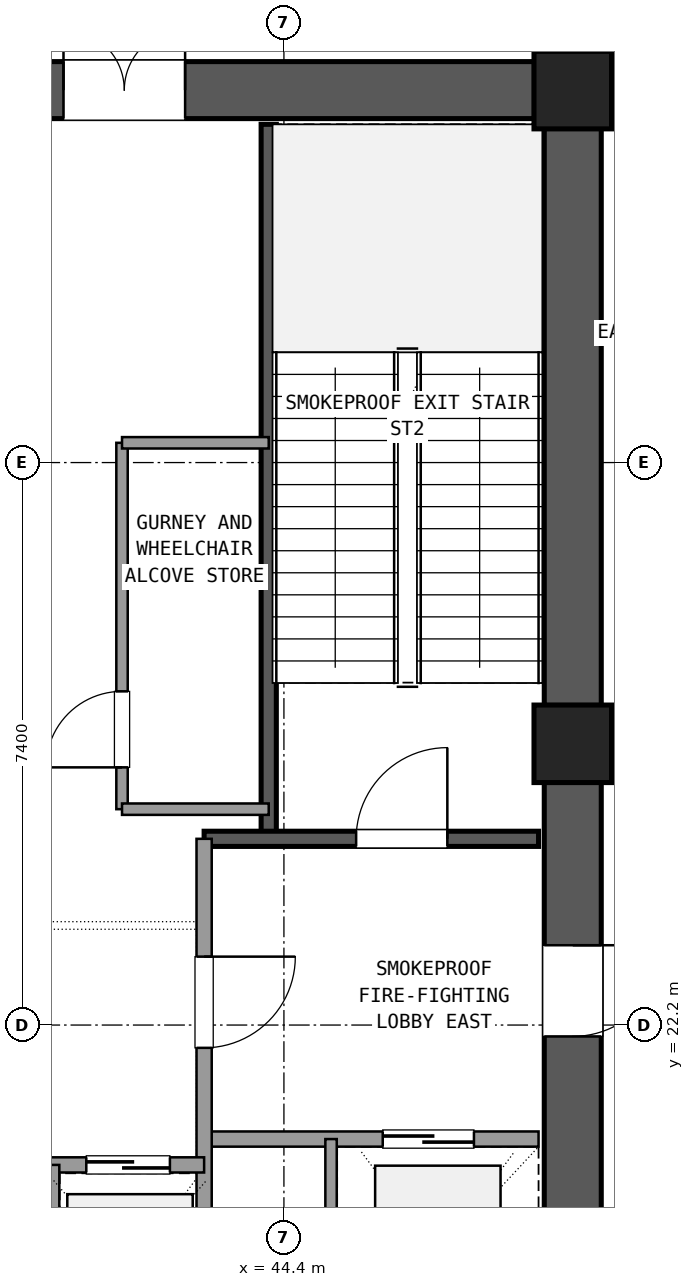
"""IFC4 building model, lengths in metres.
Left out: names, types, materials, properties, quantities, classifications, styles, units other than length and angle.
Written with IfcOpenShell. Run it as: python <this file> out.ifc"""

import sys

from ifc_helpers import new_model, si_unit, direction, frame, frame_2d, origin, origin_2d, place, context, subcontext, project, spatial, rectangle, extrude, element, fill, save


model = new_model("IFC4")
c1 = context("Model", 3, precision=1e-05, world=origin(), true_north=direction((0.0, 1.0)))
c2 = subcontext(c1, "Body", "Model", "MODEL_VIEW")
j1 = project(units=[si_unit("LENGTHUNIT", "METRE"), si_unit("PLANEANGLEUNIT", "RADIAN")], contexts=[c1])
p1 = place(None, origin())
s1 = spatial("IfcSite", under=j1, at=p1, CompositionType="ELEMENT")
p2 = place(p1, origin())
s2 = spatial("IfcBuilding", under=s1, at=p2, CompositionType="ELEMENT")
p3 = place(p2, frame((0.0, 0.0, 75.42)))
s3 = spatial("IfcBuildingStorey", under=s2, at=p3, CompositionType="ELEMENT", Elevation=75.42)
for number, where, z_axis, x_axis in (
    (1, (48.2, 25.9, 0.0), (0.0, 0.0, 1.0), (1.0, 0.0, 0.0)),
    (2, (48.2, 34.5, 0.0), (0.0, 0.0, 1.0), (1.0, 0.0, 0.0)),
):
    element("IfcColumn", number, at=place(p3, frame(where, z_axis=z_axis, x_axis=x_axis)), inside=s3, PredefinedType="COLUMN", context=c2, shape_type="SweptSolid", body=[
        extrude(rectangle(XDim=1.02, YDim=1.02, at=origin_2d()), origin(), (0.0, 0.0, 1.0), 5.76),
    ])
p4 = place(p3, frame((48.2, 17.805, 0.0), z_axis=(0.0, 0.0, 1.0), x_axis=(0.0, 1.0, 0.0)))
e3 = element("IfcWall", 3, at=p4, inside=s3, PredefinedType="SHEAR", context=c2, shape_type="SweptSolid", body=[
    extrude(rectangle(XDim=7.59, YDim=0.75, at=frame_2d((3.795, 0.0))), origin(), (0.0, 0.0, 1.0), 5.48),
])
p5 = place(p4, frame((4.245, 0.0, 0.0)))
e4 = element("IfcOpeningElement", 4, at=p5, cuts=e3, PredefinedType="OPENING", context=c2, shape_type="SweptSolid", body=[
    extrude(rectangle(XDim=1.2, YDim=2.15, at=frame_2d((0.6, 1.075))), frame((0.0, 0.385, 0.0), z_axis=(0.0, -1.0, 0.0), x_axis=(1.0, 0.0, 0.0)), (0.0, 0.0, 1.0), 0.77),
])
p6 = place(p3, frame((48.2, 26.405, 0.0), z_axis=(0.0, 0.0, 1.0), x_axis=(0.0, 1.0, 0.0)))
e5 = element("IfcWall", 5, at=p6, inside=s3, PredefinedType="SHEAR", context=c2, shape_type="SweptSolid", body=[
    extrude(rectangle(XDim=7.59, YDim=0.75, at=frame_2d((3.795, 0.0))), origin(), (0.0, 0.0, 1.0), 5.48),
])
p7 = place(p3, frame((47.695, 34.5, 0.0), z_axis=(0.0, 0.0, 1.0), x_axis=(-1.0, 0.0, 0.0)))
e6 = element("IfcWall", 6, at=p7, inside=s3, PredefinedType="SHEAR", context=c2, shape_type="SweptSolid", body=[
    extrude(rectangle(XDim=10.19, YDim=0.75, at=frame_2d((5.095, 0.0))), origin(), (0.0, 0.0, 1.0), 5.48),
])
p8 = place(p7, frame((4.595, 0.0, 0.0)))
e7 = element("IfcOpeningElement", 7, at=p8, cuts=e6, PredefinedType="OPENING", context=c2, shape_type="SweptSolid", body=[
    extrude(rectangle(XDim=1.6, YDim=2.2, at=frame_2d((0.8, 1.1))), frame((0.0, 0.385, 0.0), z_axis=(0.0, -1.0, 0.0), x_axis=(1.0, 0.0, 0.0)), (0.0, 0.0, 1.0), 0.77),
])
p9 = place(p3, frame((44.2, 24.65, 0.0), z_axis=(0.0, 0.0, 1.0), x_axis=(0.0, 1.0, 0.0)))
e8 = element("IfcWall", 8, at=p9, inside=s3, PredefinedType="SHEAR", context=c2, shape_type="SweptSolid", body=[
    extrude(rectangle(XDim=9.4, YDim=0.2, at=frame_2d((4.7, 0.0))), origin(), (0.0, 0.0, 1.0), 5.48),
])
p10 = place(p3, frame((43.35, 24.65, 0.0), z_axis=(0.0, 0.0, 1.0), x_axis=(1.0, 0.0, 0.0)))
e9 = element("IfcWall", 9, at=p10, inside=s3, PredefinedType="SHEAR", context=c2, shape_type="SweptSolid", body=[
    extrude(rectangle(XDim=4.4, YDim=0.2, at=frame_2d((2.2, 0.0))), origin(), (0.0, 0.0, 1.0), 5.48),
])
p11 = place(p10, frame((2.0, 0.0, 0.0)))
e10 = element("IfcOpeningElement", 10, at=p11, cuts=e9, PredefinedType="OPENING", context=c2, shape_type="SweptSolid", body=[
    extrude(rectangle(XDim=1.2, YDim=2.15, at=frame_2d((0.6, 1.075))), frame((0.0, 0.11, 0.0), z_axis=(0.0, -1.0, 0.0), x_axis=(1.0, 0.0, 0.0)), (0.0, 0.0, 1.0), 0.22),
])
p12 = place(p3, frame((43.35, 20.7, 0.0), z_axis=(0.0, 0.0, 1.0), x_axis=(1.0, 0.0, 0.0)))
e11 = element("IfcWall", 11, at=p12, inside=s3, PredefinedType="SOLIDWALL", context=c2, shape_type="SweptSolid", body=[
    extrude(rectangle(XDim=4.4, YDim=0.2, at=frame_2d((2.2, 0.0))), origin(), (0.0, 0.0, 1.0), 4.77),
])
p13 = place(p12, frame((2.35, 0.0, 0.0)))
e12 = element("IfcOpeningElement", 12, at=p13, cuts=e11, PredefinedType="OPENING", context=c2, shape_type="SweptSolid", body=[
    extrude(rectangle(XDim=1.2, YDim=2.15, at=frame_2d((0.6, 1.075))), frame((0.0, 0.11, 0.0), z_axis=(0.0, -1.0, 0.0), x_axis=(1.0, 0.0, 0.0)), (0.0, 0.0, 1.0), 0.22),
])
p14 = place(p3, frame((43.35, 17.75, 0.0), z_axis=(0.0, 0.0, 1.0), x_axis=(0.0, 1.0, 0.0)))
e13 = element("IfcWall", 13, at=p14, inside=s3, PredefinedType="SOLIDWALL", context=c2, shape_type="SweptSolid", body=[
    extrude(rectangle(XDim=6.9, YDim=0.2, at=frame_2d((3.45, 0.0))), origin(), (0.0, 0.0, 1.0), 4.77),
])
p15 = place(p14, frame((4.15, 0.0, 0.0)))
e14 = element("IfcOpeningElement", 14, at=p15, cuts=e13, PredefinedType="OPENING", context=c2, shape_type="SweptSolid", body=[
    extrude(rectangle(XDim=1.2, YDim=2.15, at=frame_2d((0.6, 1.075))), frame((0.0, 0.11, 0.0), z_axis=(0.0, -1.0, 0.0), x_axis=(1.0, 0.0, 0.0)), (0.0, 0.0, 1.0), 0.22),
])
p16 = place(p3, frame((45.02, 17.75, 0.0), z_axis=(0.0, 0.0, 1.0), x_axis=(0.0, 1.0, 0.0)))
e15 = element("IfcWall", 15, at=p16, inside=s3, PredefinedType="PARTITIONING", context=c2, shape_type="SweptSolid", body=[
    extrude(rectangle(XDim=2.95, YDim=0.15, at=frame_2d((1.475, 0.0))), origin(), (0.0, 0.0, 1.0), 4.77),
])
p17 = place(p3, frame((37.25, 20.36, 0.0), z_axis=(0.0, 0.0, 1.0), x_axis=(1.0, 0.0, 0.0)))
e16 = element("IfcWall", 16, at=p17, inside=s3, PredefinedType="SOLIDWALL", context=c2, shape_type="SweptSolid", body=[
    extrude(rectangle(XDim=6.1, YDim=0.2, at=frame_2d((3.05, 0.0))), origin(), (0.0, 0.0, 1.0), 4.77),
])
p18 = place(p17, frame((0.45, 0.0, 0.0)))
e17 = element("IfcOpeningElement", 17, at=p18, cuts=e16, PredefinedType="OPENING", context=c2, shape_type="SweptSolid", body=[
    extrude(rectangle(XDim=1.1, YDim=2.15, at=frame_2d((0.55, 1.075))), frame((0.0, 0.11, 0.0), z_axis=(0.0, -1.0, 0.0), x_axis=(1.0, 0.0, 0.0)), (0.0, 0.0, 1.0), 0.22),
])
p19 = place(p17, frame((2.5, 0.0, 0.0)))
e18 = element("IfcOpeningElement", 18, at=p19, cuts=e16, PredefinedType="OPENING", context=c2, shape_type="SweptSolid", body=[
    extrude(rectangle(XDim=1.1, YDim=2.15, at=frame_2d((0.55, 1.075))), frame((0.0, 0.11, 0.0), z_axis=(0.0, -1.0, 0.0), x_axis=(1.0, 0.0, 0.0)), (0.0, 0.0, 1.0), 0.22),
])
p20 = place(p17, frame((4.55, 0.0, 0.0)))
e19 = element("IfcOpeningElement", 19, at=p20, cuts=e16, PredefinedType="OPENING", context=c2, shape_type="SweptSolid", body=[
    extrude(rectangle(XDim=1.1, YDim=2.15, at=frame_2d((0.55, 1.075))), frame((0.0, 0.11, 0.0), z_axis=(0.0, -1.0, 0.0), x_axis=(1.0, 0.0, 0.0)), (0.0, 0.0, 1.0), 0.22),
])
p21 = place(p3, frame((41.37, 17.75, 0.0), z_axis=(0.0, 0.0, 1.0), x_axis=(0.0, 1.0, 0.0)))
e20 = element("IfcWall", 20, at=p21, inside=s3, PredefinedType="PARTITIONING", context=c2, shape_type="SweptSolid", body=[
    extrude(rectangle(XDim=2.61, YDim=0.15, at=frame_2d((1.305, 0.0))), origin(), (0.0, 0.0, 1.0), 4.77),
])
p22 = place(p3, frame((42.27, 25.04, 0.0), z_axis=(0.0, 0.0, 1.0), x_axis=(0.0, 1.0, 0.0)))
e21 = element("IfcWall", 21, at=p22, inside=s3, PredefinedType="PARTITIONING", context=c2, shape_type="SweptSolid", body=[
    extrude(rectangle(XDim=4.82, YDim=0.15, at=frame_2d((2.41, 0.0))), origin(), (0.0, 0.0, 1.0), 4.77),
])
p23 = place(p22, frame((0.55, 0.0, 0.0)))
e22 = element("IfcOpeningElement", 22, at=p23, cuts=e21, PredefinedType="OPENING", context=c2, shape_type="SweptSolid", body=[
    extrude(rectangle(XDim=1.0, YDim=2.15, at=frame_2d((0.5, 1.075))), frame((0.0, 0.085, 0.0), z_axis=(0.0, -1.0, 0.0), x_axis=(1.0, 0.0, 0.0)), (0.0, 0.0, 1.0), 0.17),
])
for number, where, z_axis, x_axis in (
    (23, (42.27, 25.04, 0.0), (0.0, 0.0, 1.0), (1.0, 0.0, 0.0)),
    (24, (42.27, 29.86, 0.0), (0.0, 0.0, 1.0), (1.0, 0.0, 0.0)),
):
    element("IfcWall", number, at=place(p3, frame(where, z_axis=z_axis, x_axis=x_axis)), inside=s3, PredefinedType="PARTITIONING", context=c2, shape_type="SweptSolid", body=[
        extrude(rectangle(XDim=1.93, YDim=0.15, at=frame_2d((0.965, 0.0))), origin(), (0.0, 0.0, 1.0), 4.77),
    ])
p24 = place(p11, origin())
e25 = element("IfcDoor", 25, at=p24, inside=s3, OperationType="SINGLE_SWING_RIGHT", PredefinedType="DOOR", context=c2, shape_type="SweptSolid", body=[
    extrude(rectangle(XDim=1.2, YDim=2.15, at=frame_2d((0.6, 1.075))), frame((0.0, 0.025, 0.0), z_axis=(0.0, -1.0, 0.0), x_axis=(1.0, 0.0, 0.0)), (0.0, 0.0, 1.0), 0.05),
])
fill(e10, e25)
p25 = place(p13, origin())
e26 = element("IfcDoor", 26, at=p25, inside=s3, OperationType="SLIDING_TO_RIGHT", PredefinedType="DOOR", context=c2, shape_type="SweptSolid", body=[
    extrude(rectangle(XDim=1.2, YDim=2.15, at=frame_2d((0.6, 1.075))), frame((0.0, 0.025, 0.0), z_axis=(0.0, -1.0, 0.0), x_axis=(1.0, 0.0, 0.0)), (0.0, 0.0, 1.0), 0.05),
])
fill(e12, e26)
p26 = place(p15, frame((1.2, 0.0, 0.0), z_axis=(0.0, 0.0, 1.0), x_axis=(-1.0, 0.0, 0.0)))
e27 = element("IfcDoor", 27, at=p26, inside=s3, OperationType="SINGLE_SWING_RIGHT", PredefinedType="DOOR", context=c2, shape_type="SweptSolid", body=[
    extrude(rectangle(XDim=1.2, YDim=2.15, at=frame_2d((0.6, 1.075))), frame((0.0, 0.025, 0.0), z_axis=(0.0, -1.0, 0.0), x_axis=(1.0, 0.0, 0.0)), (0.0, 0.0, 1.0), 0.05),
])
fill(e14, e27)
p27 = place(p5, frame((1.2, 0.0, 0.0), z_axis=(0.0, 0.0, 1.0), x_axis=(-1.0, 0.0, 0.0)))
e28 = element("IfcDoor", 28, at=p27, inside=s3, OperationType="SINGLE_SWING_RIGHT", PredefinedType="DOOR", context=c2, shape_type="SweptSolid", body=[
    extrude(rectangle(XDim=1.2, YDim=2.15, at=frame_2d((0.6, 1.075))), frame((0.0, 0.025, 0.0), z_axis=(0.0, -1.0, 0.0), x_axis=(1.0, 0.0, 0.0)), (0.0, 0.0, 1.0), 0.05),
])
fill(e4, e28)
p28 = place(p8, frame((1.6, 0.0, 0.0), z_axis=(0.0, 0.0, 1.0), x_axis=(-1.0, 0.0, 0.0)))
e29 = element("IfcDoor", 29, at=p28, inside=s3, OperationType="DOUBLE_DOOR_SINGLE_SWING", PredefinedType="DOOR", context=c2, shape_type="SweptSolid", body=[
    extrude(rectangle(XDim=1.6, YDim=2.2, at=frame_2d((0.8, 1.1))), frame((0.0, 0.025, 0.0), z_axis=(0.0, -1.0, 0.0), x_axis=(1.0, 0.0, 0.0)), (0.0, 0.0, 1.0), 0.05),
])
fill(e7, e29)
p29 = place(p20, origin())
e30 = element("IfcDoor", 30, at=p29, inside=s3, OperationType="SLIDING_TO_LEFT", PredefinedType="DOOR", context=c2, shape_type="SweptSolid", body=[
    extrude(rectangle(XDim=1.1, YDim=2.15, at=frame_2d((0.55, 1.075))), frame((0.0, 0.025, 0.0), z_axis=(0.0, -1.0, 0.0), x_axis=(1.0, 0.0, 0.0)), (0.0, 0.0, 1.0), 0.05),
])
fill(e19, e30)
p30 = place(p23, origin())
e31 = element("IfcDoor", 31, at=p30, inside=s3, OperationType="SINGLE_SWING_LEFT", PredefinedType="DOOR", context=c2, shape_type="SweptSolid", body=[
    extrude(rectangle(XDim=1.0, YDim=2.15, at=frame_2d((0.5, 1.075))), frame((0.0, 0.025, 0.0), z_axis=(0.0, -1.0, 0.0), x_axis=(1.0, 0.0, 0.0)), (0.0, 0.0, 1.0), 0.05),
])
fill(e22, e31)
save(model, sys.argv[1])
